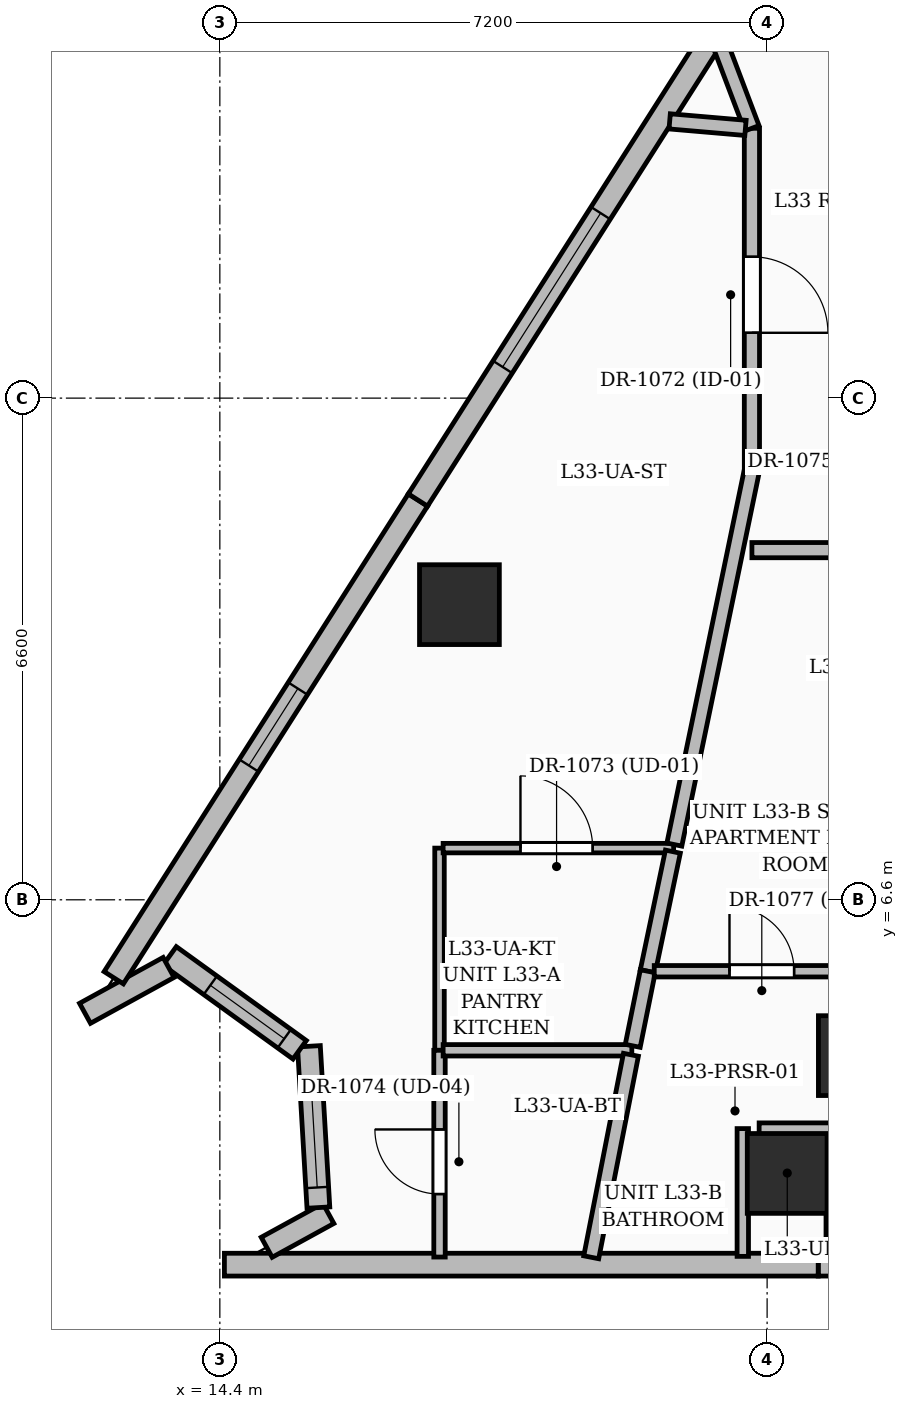
"""IFC4 building model, lengths in metres.
Left out: names, types, materials, properties, quantities, classifications, styles, units other than length and angle.
Written with IfcOpenShell. Run it as: python <this file> out.ifc"""

import sys

from ifc_helpers import new_model, si_unit, direction, frame, frame_2d, origin, origin_2d, place, context, subcontext, project, spatial, rectangle, extrude, element, fill, save


model = new_model("IFC4")
c1 = context("Model", 3, precision=1e-05, world=origin(), true_north=direction((0.0, 1.0)))
c2 = subcontext(c1, "Body", "Model", "MODEL_VIEW")
j1 = project(units=[si_unit("LENGTHUNIT", "METRE"), si_unit("PLANEANGLEUNIT", "RADIAN")], contexts=[c1])
p1 = place(None, origin())
s1 = spatial("IfcSite", under=j1, at=p1, CompositionType="ELEMENT")
p2 = place(p1, origin())
s2 = spatial("IfcBuilding", under=s1, at=p2, CompositionType="ELEMENT")
p3 = place(p2, frame((0.0, 0.0, 132.0)))
s3 = spatial("IfcBuildingStorey", under=s2, at=p3, CompositionType="ELEMENT", Elevation=132.0)
for number, where, z_axis, x_axis in (
    (1, (22.8, 4.55, 0.0), (0.0, 0.0, 1.0), (1.0, 0.0, 0.0)),
    (2, (21.864, 3.0, 0.0), (0.0, 0.0, 1.0), (1.0, 0.0, 0.0)),
    (3, (17.552, 10.483, 0.0), (0.0, 0.0, 1.0), (1.0, 0.0, 0.0)),
):
    element("IfcColumn", number, at=place(p3, frame(where, z_axis=z_axis, x_axis=x_axis)), inside=s3, PredefinedType="COLUMN", context=c2, shape_type="SweptSolid", body=[
        extrude(rectangle(XDim=1.05, YDim=1.05, at=origin_2d()), origin(), (0.0, 0.0, 1.0), 3.6),
    ])
p4 = place(p3, frame((30.084, 1.8, 0.0), z_axis=(0.0, 0.0, 1.0), x_axis=(-1.0, 0.0, 0.0)))
e4 = element("IfcWall", 4, at=p4, inside=s3, PredefinedType="SOLIDWALL", context=c2, shape_type="SweptSolid", body=[
    extrude(rectangle(XDim=7.812, YDim=0.3, at=frame_2d((3.906, 0.0))), origin(), (0.0, 0.0, 1.0), 3.35),
])
p5 = place(p4, frame((4.55, 0.0, 0.8)))
e5 = element("IfcOpeningElement", 5, at=p5, cuts=e4, PredefinedType="OPENING", context=c2, shape_type="SweptSolid", body=[
    extrude(rectangle(XDim=1.2, YDim=1.8, at=frame_2d((0.6, 0.9))), frame((0.0, 0.16, 0.0), z_axis=(0.0, -1.0, 0.0), x_axis=(1.0, 0.0, 0.0)), (0.0, 0.0, 1.0), 0.32),
])
p6 = place(p4, frame((1.175, 0.0, 0.8)))
e6 = element("IfcOpeningElement", 6, at=p6, cuts=e4, PredefinedType="OPENING", context=c2, shape_type="SweptSolid", body=[
    extrude(rectangle(XDim=1.2, YDim=1.8, at=frame_2d((0.6, 0.9))), frame((0.0, 0.16, 0.0), z_axis=(0.0, -1.0, 0.0), x_axis=(1.0, 0.0, 0.0)), (0.0, 0.0, 1.0), 0.32),
])
p7 = place(p3, frame((22.272, 1.8, 0.0), z_axis=(0.0, 0.0, 1.0), x_axis=(-1.0, 0.0, 0.0)))
e7 = element("IfcWall", 7, at=p7, inside=s3, PredefinedType="SOLIDWALL", context=c2, shape_type="SweptSolid", body=[
    extrude(rectangle(XDim=7.812, YDim=0.3, at=frame_2d((3.906, 0.0))), origin(), (0.0, 0.0, 1.0), 3.35),
])
p8 = place(p3, frame((15.016, 2.028, 0.0), z_axis=(0.0, 0.0, 1.0), x_axis=(0.876794471231, 0.48086531921, 0.0)))
e8 = element("IfcWall", 8, at=p8, inside=s3, PredefinedType="SOLIDWALL", context=c2, shape_type="SweptSolid", body=[
    extrude(rectangle(XDim=0.926, YDim=0.3, at=frame_2d((0.463, 0.0))), origin(), (0.0, 0.0, 1.0), 3.35),
])
p9 = place(p3, frame((15.697, 2.551, 0.0), z_axis=(0.0, 0.0, 1.0), x_axis=(-0.058688358982, 0.99827635278, 0.0)))
e9 = element("IfcWall", 9, at=p9, inside=s3, PredefinedType="SOLIDWALL", context=c2, shape_type="SweptSolid", body=[
    extrude(rectangle(XDim=2.126, YDim=0.3, at=frame_2d((1.063, 0.0))), origin(), (0.0, 0.0, 1.0), 3.35),
])
p10 = place(p9, frame((0.265, 0.0, 0.8)))
e10 = element("IfcOpeningElement", 10, at=p10, cuts=e9, PredefinedType="OPENING", context=c2, shape_type="SweptSolid", body=[
    extrude(rectangle(XDim=1.2, YDim=1.8, at=frame_2d((0.6, 0.9))), frame((0.0, 0.16, 0.0), z_axis=(0.0, -1.0, 0.0), x_axis=(1.0, 0.0, 0.0)), (0.0, 0.0, 1.0), 0.32),
])
p11 = place(p3, frame((15.45, 4.627, 0.0), z_axis=(0.0, 0.0, 1.0), x_axis=(-0.810712787228, 0.585444084969, 0.0)))
e11 = element("IfcWall", 11, at=p11, inside=s3, PredefinedType="SOLIDWALL", context=c2, shape_type="SweptSolid", body=[
    extrude(rectangle(XDim=2.11, YDim=0.3, at=frame_2d((1.055, 0.0))), origin(), (0.0, 0.0, 1.0), 3.35),
])
p12 = place(p11, frame((0.25, 0.0, 0.8)))
e12 = element("IfcOpeningElement", 12, at=p12, cuts=e11, PredefinedType="OPENING", context=c2, shape_type="SweptSolid", body=[
    extrude(rectangle(XDim=1.2, YDim=1.8, at=frame_2d((0.6, 0.9))), frame((0.0, 0.16, 0.0), z_axis=(0.0, -1.0, 0.0), x_axis=(1.0, 0.0, 0.0)), (0.0, 0.0, 1.0), 0.32),
])
p13 = place(p3, frame((13.726, 5.71, 0.0), z_axis=(0.0, 0.0, 1.0), x_axis=(-0.876642942611, -0.481141508467, 0.0)))
e13 = element("IfcWall", 13, at=p13, inside=s3, PredefinedType="SOLIDWALL", context=c2, shape_type="SweptSolid", body=[
    extrude(rectangle(XDim=1.254, YDim=0.3, at=frame_2d((0.627, 0.0))), origin(), (0.0, 0.0, 1.0), 3.35),
])
p14 = place(p3, frame((13.004, 5.575, 0.0), z_axis=(0.0, 0.0, 1.0), x_axis=(0.5371108129, 0.843511692074, 0.0)))
e14 = element("IfcWall", 14, at=p14, inside=s3, PredefinedType="SOLIDWALL", context=c2, shape_type="SweptSolid", body=[
    extrude(rectangle(XDim=7.451, YDim=0.3, at=frame_2d((3.726, 0.0))), origin(), (0.0, 0.0, 1.0), 3.35),
])
p15 = place(p14, frame((3.31, 0.0, 0.8)))
e15 = element("IfcOpeningElement", 15, at=p15, cuts=e14, PredefinedType="OPENING", context=c2, shape_type="SweptSolid", body=[
    extrude(rectangle(XDim=1.2, YDim=1.8, at=frame_2d((0.6, 0.9))), frame((0.0, 0.16, 0.0), z_axis=(0.0, -1.0, 0.0), x_axis=(1.0, 0.0, 0.0)), (0.0, 0.0, 1.0), 0.32),
])
p16 = place(p3, frame((17.006, 11.86, 0.0), z_axis=(0.0, 0.0, 1.0), x_axis=(0.537098524817, 0.843519516454, 0.0)))
e16 = element("IfcWall", 16, at=p16, inside=s3, PredefinedType="SOLIDWALL", context=c2, shape_type="SweptSolid", body=[
    extrude(rectangle(XDim=7.791, YDim=0.3, at=frame_2d((3.895, 0.0))), origin(), (0.0, 0.0, 1.0), 3.35),
])
p17 = place(p16, frame((2.075, 0.0, 0.6)))
e17 = element("IfcOpeningElement", 17, at=p17, cuts=e16, PredefinedType="OPENING", context=c2, shape_type="SweptSolid", body=[
    extrude(rectangle(XDim=2.4, YDim=2.1, at=frame_2d((1.2, 1.05))), frame((0.0, 0.16, 0.0), z_axis=(0.0, -1.0, 0.0), x_axis=(1.0, 0.0, 0.0)), (0.0, 0.0, 1.0), 0.32),
])
p18 = place(p3, frame((21.4, 16.75, 0.0), z_axis=(0.0, 0.0, 1.0), x_axis=(0.0, -1.0, 0.0)))
e18 = element("IfcWall", 18, at=p18, inside=s3, PredefinedType="PARTITIONING", context=c2, shape_type="SweptSolid", body=[
    extrude(rectangle(XDim=4.5, YDim=0.2, at=frame_2d((2.25, 0.0))), origin(), (0.0, 0.0, 1.0), 2.57),
])
p19 = place(p18, frame((1.69, 0.0, 0.0)))
e19 = element("IfcOpeningElement", 19, at=p19, cuts=e18, PredefinedType="OPENING", context=c2, shape_type="SweptSolid", body=[
    extrude(rectangle(XDim=1.0, YDim=2.2, at=frame_2d((0.5, 1.1))), frame((0.0, 0.11, 0.0), z_axis=(0.0, -1.0, 0.0), x_axis=(1.0, 0.0, 0.0)), (0.0, 0.0, 1.0), 0.22),
])
p20 = place(p3, frame((21.4, 11.2, 0.0), z_axis=(0.0, 0.0, 1.0), x_axis=(1.0, 0.0, 0.0)))
e20 = element("IfcWall", 20, at=p20, inside=s3, PredefinedType="PARTITIONING", context=c2, shape_type="SweptSolid", body=[
    extrude(rectangle(XDim=3.469, YDim=0.2, at=frame_2d((1.735, 0.0))), origin(), (0.0, 0.0, 1.0), 3.01),
])
p21 = place(p20, frame((1.335, 0.0, 0.0)))
e21 = element("IfcOpeningElement", 21, at=p21, cuts=e20, PredefinedType="OPENING", context=c2, shape_type="SweptSolid", body=[
    extrude(rectangle(XDim=1.0, YDim=2.2, at=frame_2d((0.5, 1.1))), frame((0.0, 0.11, 0.0), z_axis=(0.0, -1.0, 0.0), x_axis=(1.0, 0.0, 0.0)), (0.0, 0.0, 1.0), 0.22),
])
p22 = place(p3, frame((27.22, 17.75, 0.0), z_axis=(0.0, 0.0, 1.0), x_axis=(-0.998738006895, 0.050223436592, 0.0)))
e22 = element("IfcWall", 22, at=p22, inside=s3, PredefinedType="PARTITIONING", context=c2, shape_type="SweptSolid", body=[
    extrude(rectangle(XDim=6.135, YDim=0.2, at=frame_2d((3.067, 0.0))), origin(), (0.0, 0.0, 1.0), 2.372),
])
p23 = place(p22, frame((2.404, 0.0, 0.0)))
e23 = element("IfcOpeningElement", 23, at=p23, cuts=e22, PredefinedType="OPENING", context=c2, shape_type="SweptSolid", body=[
    extrude(rectangle(XDim=1.0, YDim=2.2, at=frame_2d((0.5, 1.1))), frame((0.0, 0.11, 0.0), z_axis=(0.0, -1.0, 0.0), x_axis=(1.0, 0.0, 0.0)), (0.0, 0.0, 1.0), 0.22),
])
p24 = place(p3, frame((20.981, 17.857, 0.0), z_axis=(0.0, 0.0, 1.0), x_axis=(0.353970125301, -0.935256729671, 0.0)))
e24 = element("IfcWall", 24, at=p24, inside=s3, PredefinedType="PARTITIONING", context=c2, shape_type="SweptSolid", body=[
    extrude(rectangle(XDim=1.184, YDim=0.2, at=frame_2d((0.592, 0.0))), origin(), (0.0, 0.0, 1.0), 2.57),
])
p25 = place(p3, frame((17.29, 4.62, 0.0), z_axis=(0.0, 0.0, 1.0), x_axis=(0.0, 1.0, 0.0)))
e25 = element("IfcWall", 25, at=p25, inside=s3, PredefinedType="PARTITIONING", context=c2, shape_type="SweptSolid", body=[
    extrude(rectangle(XDim=2.66, YDim=0.125, at=frame_2d((1.33, 0.0))), origin(), (0.0, 0.0, 1.0), 3.35),
])
p26 = place(p3, frame((17.337, 7.28, 0.0), z_axis=(0.0, 0.0, 1.0), x_axis=(1.0, 0.0, 0.0)))
e26 = element("IfcWall", 26, at=p26, inside=s3, PredefinedType="PARTITIONING", context=c2, shape_type="SweptSolid", body=[
    extrude(rectangle(XDim=3.033, YDim=0.125, at=frame_2d((1.516, 0.0))), origin(), (0.0, 0.0, 1.0), 2.57),
])
p27 = place(p26, frame((1.018, 0.0, 0.0)))
e27 = element("IfcOpeningElement", 27, at=p27, cuts=e26, PredefinedType="OPENING", context=c2, shape_type="SweptSolid", body=[
    extrude(rectangle(XDim=0.95, YDim=2.2, at=frame_2d((0.475, 1.1))), frame((0.0, 0.072, 0.0), z_axis=(0.0, -1.0, 0.0), x_axis=(1.0, 0.0, 0.0)), (0.0, 0.0, 1.0), 0.145),
])
p28 = place(p3, frame((17.29, 1.9, 0.0), z_axis=(0.0, 0.0, 1.0), x_axis=(0.0, 1.0, 0.0)))
e28 = element("IfcWall", 28, at=p28, inside=s3, PredefinedType="PARTITIONING", context=c2, shape_type="SweptSolid", body=[
    extrude(rectangle(XDim=2.72, YDim=0.15, at=frame_2d((1.36, 0.0))), origin(), (0.0, 0.0, 1.0), 3.35),
])
p29 = place(p28, frame((0.829, 0.0, 0.0)))
e29 = element("IfcOpeningElement", 29, at=p29, cuts=e28, PredefinedType="OPENING", context=c2, shape_type="SweptSolid", body=[
    extrude(rectangle(XDim=0.85, YDim=2.1, at=frame_2d((0.425, 1.05))), frame((0.0, 0.085, 0.0), z_axis=(0.0, -1.0, 0.0), x_axis=(1.0, 0.0, 0.0)), (0.0, 0.0, 1.0), 0.17),
])
p30 = place(p3, frame((20.38, 7.326, 0.0), z_axis=(0.0, 0.0, 1.0), x_axis=(0.202909045779, 0.979197589428, 0.0)))
e30 = element("IfcWall", 30, at=p30, inside=s3, PredefinedType="PARTITIONING", context=c2, shape_type="SweptSolid", body=[
    extrude(rectangle(XDim=5.028, YDim=0.2, at=frame_2d((2.514, 0.0))), origin(), (0.0, 0.0, 1.0), 2.372),
])
p31 = place(p3, frame((21.315, 16.755, 0.0), z_axis=(0.0, 0.0, 1.0), x_axis=(-0.996327050831, 0.085629479638, 0.0)))
e31 = element("IfcWall", 31, at=p31, inside=s3, PredefinedType="PARTITIONING", context=c2, shape_type="SweptSolid", body=[
    extrude(rectangle(XDim=1.001, YDim=0.2, at=frame_2d((0.5, 0.0))), origin(), (0.0, 0.0, 1.0), 2.57),
])
p32 = place(p3, frame((17.337, 4.62, 0.0), z_axis=(0.0, 0.0, 1.0), x_axis=(1.0, 0.0, 0.0)))
e32 = element("IfcWall", 32, at=p32, inside=s3, PredefinedType="PARTITIONING", context=c2, shape_type="SweptSolid", body=[
    extrude(rectangle(XDim=2.483, YDim=0.15, at=frame_2d((1.241, 0.0))), origin(), (0.0, 0.0, 1.0), 3.35),
])
p33 = place(p3, frame((20.03, 5.66, 0.0), z_axis=(0.0, 0.0, 1.0), x_axis=(0.205306341655, 0.978697760331, 0.0)))
e33 = element("IfcWall", 33, at=p33, inside=s3, PredefinedType="PARTITIONING", context=c2, shape_type="SweptSolid", body=[
    extrude(rectangle(XDim=1.608, YDim=0.2, at=frame_2d((0.804, 0.0))), origin(), (0.0, 0.0, 1.0), 2.57),
])
p34 = place(p3, frame((19.832, 4.679, 0.0), z_axis=(0.0, 0.0, 1.0), x_axis=(0.198038737433, 0.980194194268, 0.0)))
e34 = element("IfcWall", 34, at=p34, inside=s3, PredefinedType="PARTITIONING", context=c2, shape_type="SweptSolid", body=[
    extrude(rectangle(XDim=1.001, YDim=0.2, at=frame_2d((0.5, 0.0))), origin(), (0.0, 0.0, 1.0), 2.57),
])
p35 = place(p3, frame((19.286, 1.897, 0.0), z_axis=(0.0, 0.0, 1.0), x_axis=(0.192448421269, 0.981307090136, 0.0)))
e35 = element("IfcWall", 35, at=p35, inside=s3, PredefinedType="PARTITIONING", context=c2, shape_type="SweptSolid", body=[
    extrude(rectangle(XDim=2.715, YDim=0.2, at=frame_2d((1.357, 0.0))), origin(), (0.0, 0.0, 1.0), 3.35),
])
p36 = place(p3, frame((20.115, 5.66, 0.0), z_axis=(0.0, 0.0, 1.0), x_axis=(1.0, 0.0, 0.0)))
e36 = element("IfcWall", 36, at=p36, inside=s3, PredefinedType="PARTITIONING", context=c2, shape_type="SweptSolid", body=[
    extrude(rectangle(XDim=2.915, YDim=0.15, at=frame_2d((1.458, 0.0))), origin(), (0.0, 0.0, 1.0), 2.57),
])
p37 = place(p36, frame((0.99, 0.0, 0.0)))
e37 = element("IfcOpeningElement", 37, at=p37, cuts=e36, PredefinedType="OPENING", context=c2, shape_type="SweptSolid", body=[
    extrude(rectangle(XDim=0.85, YDim=2.1, at=frame_2d((0.425, 1.05))), frame((0.0, 0.085, 0.0), z_axis=(0.0, -1.0, 0.0), x_axis=(1.0, 0.0, 0.0)), (0.0, 0.0, 1.0), 0.17),
])
p38 = place(p3, frame((21.64, 1.889, 0.0), z_axis=(0.0, 0.0, 1.0), x_axis=(0.0, 1.0, 0.0)))
e38 = element("IfcWall", 38, at=p38, inside=s3, PredefinedType="PARTITIONING", context=c2, shape_type="SweptSolid", body=[
    extrude(rectangle(XDim=0.02, YDim=0.15, at=frame_2d((0.01, 0.0))), origin(), (0.0, 0.0, 1.0), 3.35),
])
p39 = place(p3, frame((21.28, 1.909, 0.0), z_axis=(0.0, 0.0, 1.0), x_axis=(0.0, 1.0, 0.0)))
e39 = element("IfcWall", 39, at=p39, inside=s3, PredefinedType="PARTITIONING", context=c2, shape_type="SweptSolid", body=[
    extrude(rectangle(XDim=1.681, YDim=0.15, at=frame_2d((0.841, 0.0))), origin(), (0.0, 0.0, 1.0), 2.57),
])
p40 = place(p3, frame((21.495, 3.59, 0.0), z_axis=(0.0, 0.0, 1.0), x_axis=(1.0, 0.0, 0.0)))
e40 = element("IfcWall", 40, at=p40, inside=s3, PredefinedType="PARTITIONING", context=c2, shape_type="SweptSolid", body=[
    extrude(rectangle(XDim=0.955, YDim=0.15, at=frame_2d((0.478, 0.0))), origin(), (0.0, 0.0, 1.0), 2.57),
])
p41 = place(p3, frame((22.45, 3.375, 0.0), z_axis=(0.0, 0.0, 1.0), x_axis=(0.0, -1.0, 0.0)))
e41 = element("IfcWall", 41, at=p41, inside=s3, PredefinedType="PARTITIONING", context=c2, shape_type="SweptSolid", body=[
    extrude(rectangle(XDim=1.466, YDim=0.15, at=frame_2d((0.733, 0.0))), origin(), (0.0, 0.0, 1.0), 2.57),
])
p42 = place(p3, frame((22.08, 1.909, 0.0), z_axis=(0.0, 0.0, 1.0), x_axis=(0.0, -1.0, 0.0)))
e42 = element("IfcWall", 42, at=p42, inside=s3, PredefinedType="PARTITIONING", context=c2, shape_type="SweptSolid", body=[
    extrude(rectangle(XDim=0.02, YDim=0.15, at=frame_2d((0.01, 0.0))), origin(), (0.0, 0.0, 1.0), 3.35),
])
p43 = place(p10, origin())
e43 = element("IfcWindow", 43, at=p43, inside=s3, PartitioningType="SINGLE_PANEL", PredefinedType="WINDOW", context=c2, shape_type="SweptSolid", body=[
    extrude(rectangle(XDim=1.2, YDim=1.8, at=frame_2d((0.6, 0.9))), frame((0.0, 0.03, 0.0), z_axis=(0.0, -1.0, 0.0), x_axis=(1.0, 0.0, 0.0)), (0.0, 0.0, 1.0), 0.06),
])
fill(e10, e43)
p44 = place(p12, origin())
e44 = element("IfcWindow", 44, at=p44, inside=s3, PartitioningType="SINGLE_PANEL", PredefinedType="WINDOW", context=c2, shape_type="SweptSolid", body=[
    extrude(rectangle(XDim=1.2, YDim=1.8, at=frame_2d((0.6, 0.9))), frame((0.0, 0.03, 0.0), z_axis=(0.0, -1.0, 0.0), x_axis=(1.0, 0.0, 0.0)), (0.0, 0.0, 1.0), 0.06),
])
fill(e12, e44)
p45 = place(p15, origin())
e45 = element("IfcWindow", 45, at=p45, inside=s3, PartitioningType="SINGLE_PANEL", PredefinedType="WINDOW", context=c2, shape_type="SweptSolid", body=[
    extrude(rectangle(XDim=1.2, YDim=1.8, at=frame_2d((0.6, 0.9))), frame((0.0, 0.03, 0.0), z_axis=(0.0, -1.0, 0.0), x_axis=(1.0, 0.0, 0.0)), (0.0, 0.0, 1.0), 0.06),
])
fill(e15, e45)
p46 = place(p17, origin())
e46 = element("IfcWindow", 46, at=p46, inside=s3, PartitioningType="SINGLE_PANEL", PredefinedType="WINDOW", context=c2, shape_type="SweptSolid", body=[
    extrude(rectangle(XDim=2.4, YDim=2.1, at=frame_2d((1.2, 1.05))), frame((0.0, 0.03, 0.0), z_axis=(0.0, -1.0, 0.0), x_axis=(1.0, 0.0, 0.0)), (0.0, 0.0, 1.0), 0.06),
])
fill(e17, e46)
p47 = place(p19, origin())
e47 = element("IfcDoor", 47, at=p47, inside=s3, OperationType="SINGLE_SWING_RIGHT", PredefinedType="DOOR", context=c2, shape_type="SweptSolid", body=[
    extrude(rectangle(XDim=1.0, YDim=2.2, at=frame_2d((0.5, 1.1))), frame((0.0, 0.025, 0.0), z_axis=(0.0, -1.0, 0.0), x_axis=(1.0, 0.0, 0.0)), (0.0, 0.0, 1.0), 0.05),
])
fill(e19, e47)
p48 = place(p27, origin())
e48 = element("IfcDoor", 48, at=p48, inside=s3, OperationType="SINGLE_SWING_LEFT", PredefinedType="DOOR", context=c2, shape_type="SweptSolid", body=[
    extrude(rectangle(XDim=0.95, YDim=2.2, at=frame_2d((0.475, 1.1))), frame((0.0, 0.025, 0.0), z_axis=(0.0, -1.0, 0.0), x_axis=(1.0, 0.0, 0.0)), (0.0, 0.0, 1.0), 0.05),
])
fill(e27, e48)
p49 = place(p29, origin())
e49 = element("IfcDoor", 49, at=p49, inside=s3, OperationType="SINGLE_SWING_RIGHT", PredefinedType="DOOR", context=c2, shape_type="SweptSolid", body=[
    extrude(rectangle(XDim=0.85, YDim=2.1, at=frame_2d((0.425, 1.05))), frame((0.0, 0.025, 0.0), z_axis=(0.0, -1.0, 0.0), x_axis=(1.0, 0.0, 0.0)), (0.0, 0.0, 1.0), 0.05),
])
fill(e29, e49)
p50 = place(p37, origin())
e50 = element("IfcDoor", 50, at=p50, inside=s3, OperationType="SINGLE_SWING_LEFT", PredefinedType="DOOR", context=c2, shape_type="SweptSolid", body=[
    extrude(rectangle(XDim=0.85, YDim=2.1, at=frame_2d((0.425, 1.05))), frame((0.0, 0.025, 0.0), z_axis=(0.0, -1.0, 0.0), x_axis=(1.0, 0.0, 0.0)), (0.0, 0.0, 1.0), 0.05),
])
fill(e37, e50)
save(model, sys.argv[1])
